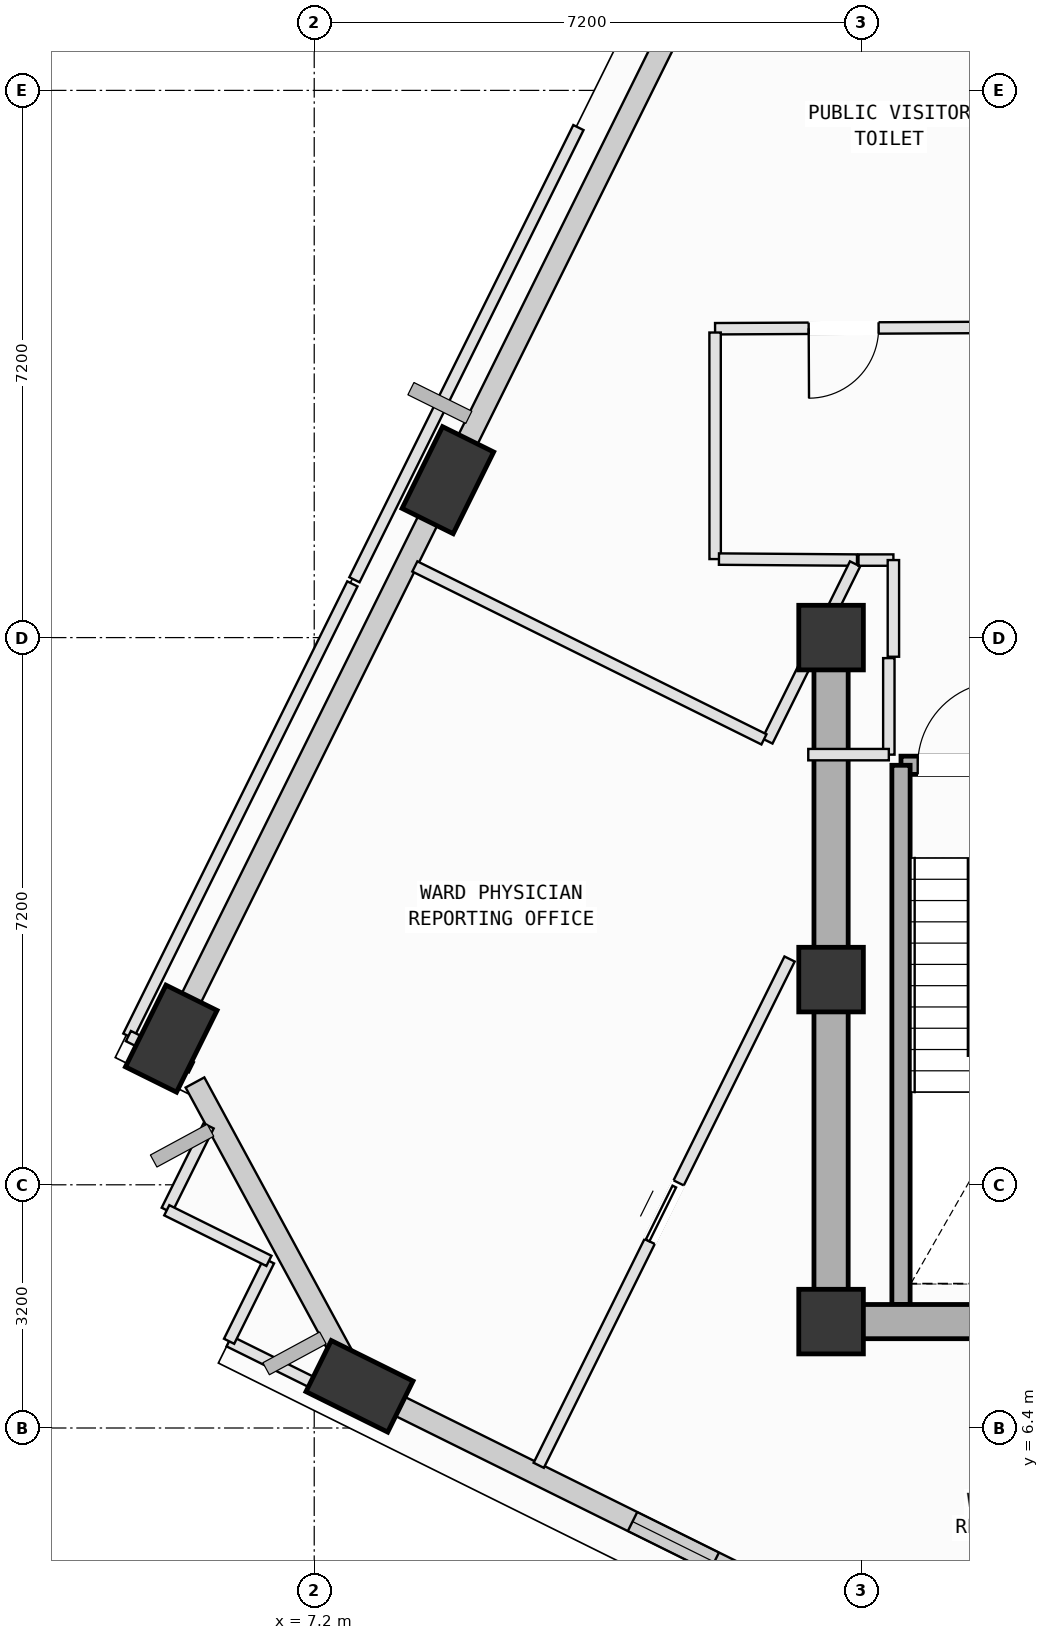
"""IFC4 building model, lengths in metres.
Left out: names, types, materials, properties, quantities, classifications, styles, units other than length and angle.
Written with IfcOpenShell. Run it as: python <this file> out.ifc"""

import sys

from ifc_helpers import new_model, si_unit, direction, frame, frame_2d, origin, origin_2d, place, context, subcontext, project, spatial, rectangle, extrude, element, fill, save


model = new_model("IFC4")
c1 = context("Model", 3, precision=1e-05, world=origin(), true_north=direction((0.0, 1.0)))
c2 = subcontext(c1, "Body", "Model", "MODEL_VIEW")
j1 = project(units=[si_unit("LENGTHUNIT", "METRE"), si_unit("PLANEANGLEUNIT", "RADIAN")], contexts=[c1])
p1 = place(None, origin())
s1 = spatial("IfcSite", under=j1, at=p1, CompositionType="ELEMENT")
p2 = place(p1, origin())
s2 = spatial("IfcBuilding", under=s1, at=p2, CompositionType="ELEMENT")
p3 = place(p2, frame((0.0, 0.0, 296.6)))
s3 = spatial("IfcBuildingStorey", under=s2, at=p3, CompositionType="ELEMENT", Elevation=296.6)
for number, where, z_axis, x_axis in (
    (1, (14.0, 7.8, 0.0), (0.0, 0.0, 1.0), (1.0, 0.0, 0.0)),
    (2, (14.0, 12.3, 0.0), (0.0, 0.0, 1.0), (1.0, 0.0, 0.0)),
    (3, (14.0, 16.8, 0.0), (0.0, 0.0, 1.0), (1.0, 0.0, 0.0)),
):
    element("IfcColumn", number, at=place(p3, frame(where, z_axis=z_axis, x_axis=x_axis)), inside=s3, PredefinedType="COLUMN", context=c2, shape_type="SweptSolid", body=[
        extrude(rectangle(XDim=0.85, YDim=0.85, at=origin_2d()), origin(), (0.0, 0.0, 1.0), 4.0),
    ])
p4 = place(p3, frame((8.958, 18.871, 0.002), z_axis=(0.025274890119, -0.101342588264, 0.994530471998), x_axis=(0.215002324818, 0.972118317881, 0.093594745379)))
e4 = element("IfcColumn", 4, at=p4, inside=s3, PredefinedType="COLUMN", context=c2, shape_type="SweptSolid", body=[
    extrude(rectangle(XDim=1.2, YDim=0.75, at=origin_2d()), origin(), (0.0, 0.0, 1.0), 4.018),
])
p5 = place(p3, frame((5.319, 11.523, 0.002), z_axis=(0.055495895792, -0.115838594711, 0.991716504615), x_axis=(0.016329389577, 0.993219639366, 0.115100386683)))
e5 = element("IfcColumn", 5, at=p5, inside=s3, PredefinedType="COLUMN", context=c2, shape_type="SweptSolid", body=[
    extrude(rectangle(XDim=1.2, YDim=0.75, at=origin_2d()), origin(), (0.0, 0.0, 1.0), 4.03),
])
p6 = place(p3, frame((7.796, 6.948, 0.002), z_axis=(0.074271893377, -0.105470935048, 0.991644879841), x_axis=(-0.986085355278, -0.156068608099, 0.057256105985)))
e6 = element("IfcColumn", 6, at=p6, inside=s3, PredefinedType="COLUMN", context=c2, shape_type="SweptSolid", body=[
    extrude(rectangle(XDim=1.2, YDim=0.75, at=origin_2d()), origin(), (0.0, 0.0, 1.0), 4.03),
])
p7 = place(p3, frame((9.053, 19.062, 0.0), z_axis=(0.0, 0.0, 1.0), x_axis=(0.443860814278, 0.896095741285, 0.0)))
e7 = element("IfcWall", 7, at=p7, inside=s3, PredefinedType="SOLIDWALL", context=c2, shape_type="SweptSolid", body=[
    extrude(rectangle(XDim=7.434, YDim=0.28, at=frame_2d((3.717, 0.0))), origin(), (0.0, 0.0, 1.0), 3.265),
])
p8 = place(p3, frame((5.399, 11.686, 0.0), z_axis=(0.0, 0.0, 1.0), x_axis=(0.443844166841, 0.896103987025, 0.0)))
e8 = element("IfcWall", 8, at=p8, inside=s3, PredefinedType="SOLIDWALL", context=c2, shape_type="SweptSolid", body=[
    extrude(rectangle(XDim=7.485, YDim=0.28, at=frame_2d((3.742, 0.0))), origin(), (0.0, 0.0, 1.0), 3.265),
])
p9 = place(p3, frame((7.73, 7.07, 0.0), z_axis=(0.0, 0.0, 1.0), x_axis=(-0.476110062992, 0.879385699177, 0.0)))
e9 = element("IfcWall", 9, at=p9, inside=s3, PredefinedType="SOLIDWALL", context=c2, shape_type="SweptSolid", body=[
    extrude(rectangle(XDim=4.408, YDim=0.28, at=frame_2d((2.204, 0.0))), origin(), (0.0, 0.0, 1.0), 3.265),
])
p10 = place(p3, frame((13.563, 4.092, 0.0), z_axis=(0.0, 0.0, 1.0), x_axis=(-0.896112517924, 0.443826942873, 0.0)))
e10 = element("IfcWall", 10, at=p10, inside=s3, PredefinedType="SOLIDWALL", context=c2, shape_type="SweptSolid", body=[
    extrude(rectangle(XDim=5.83, YDim=0.28, at=frame_2d((2.915, 0.0))), origin(), (0.0, 0.0, 1.0), 3.265),
])
p11 = place(p10, frame((1.228, 0.0, 0.75)))
e11 = element("IfcOpeningElement", 11, at=p11, cuts=e10, PredefinedType="OPENING", context=c2, shape_type="SweptSolid", body=[
    extrude(rectangle(XDim=1.2, YDim=1.75, at=frame_2d((0.6, 0.875))), frame((0.0, 0.15, 0.0), z_axis=(0.0, -1.0, 0.0), x_axis=(1.0, 0.0, 0.0)), (0.0, 0.0, 1.0), 0.3),
])
p12 = place(p3, frame((14.92, 15.12, 0.0), z_axis=(0.0, 0.0, 1.0), x_axis=(1.0, 0.0, 0.0)))
e12 = element("IfcWall", 12, at=p12, inside=s3, PredefinedType="SOLIDWALL", context=c2, shape_type="SweptSolid", body=[
    extrude(rectangle(XDim=3.46, YDim=0.24, at=frame_2d((1.73, 0.0))), origin(), (0.0, 0.0, 1.0), 3.78),
])
p13 = place(p12, frame((0.22, 0.0, 0.0)))
e13 = element("IfcOpeningElement", 13, at=p13, cuts=e12, PredefinedType="OPENING", context=c2, shape_type="SweptSolid", body=[
    extrude(rectangle(XDim=1.1, YDim=2.15, at=frame_2d((0.55, 1.075))), frame((0.0, 0.13, 0.0), z_axis=(0.0, -1.0, 0.0), x_axis=(1.0, 0.0, 0.0)), (0.0, 0.0, 1.0), 0.26),
])
p14 = place(p3, frame((14.92, 8.025, 0.0), z_axis=(0.0, 0.0, 1.0), x_axis=(0.0, 1.0, 0.0)))
e14 = element("IfcWall", 14, at=p14, inside=s3, PredefinedType="SOLIDWALL", context=c2, shape_type="SweptSolid", body=[
    extrude(rectangle(XDim=7.095, YDim=0.24, at=frame_2d((3.548, 0.0))), origin(), (0.0, 0.0, 1.0), 3.78),
])
p15 = place(p3, frame((14.0, 7.8, 0.0), z_axis=(0.0, 0.0, 1.0), x_axis=(1.0, 0.0, 0.0)))
e15 = element("IfcWall", 15, at=p15, inside=s3, PredefinedType="SHEAR", context=c2, shape_type="SweptSolid", body=[
    extrude(rectangle(XDim=10.8, YDim=0.45, at=frame_2d((5.4, 0.0))), origin(), (0.0, 0.0, 1.0), 3.78),
])
p16 = place(p3, frame((14.0, 16.8, 0.0), z_axis=(0.0, 0.0, 1.0), x_axis=(0.0, -1.0, 0.0)))
e16 = element("IfcWall", 16, at=p16, inside=s3, PredefinedType="SHEAR", context=c2, shape_type="SweptSolid", body=[
    extrude(rectangle(XDim=9.0, YDim=0.45, at=frame_2d((4.5, 0.0))), origin(), (0.0, 0.0, 1.0), 3.78),
])
p17 = place(p3, frame((10.154, 5.909, 0.0), z_axis=(0.0, 0.0, 1.0), x_axis=(0.443874121777, 0.896089149592, 0.0)))
e17 = element("IfcWall", 17, at=p17, inside=s3, PredefinedType="PARTITIONING", context=c2, shape_type="SweptSolid", body=[
    extrude(rectangle(XDim=7.435, YDim=0.15, at=frame_2d((3.717, 0.0))), origin(), (0.0, 0.0, 1.0), 3.78),
])
p18 = place(p17, frame((3.287, 0.0, 0.0)))
e18 = element("IfcOpeningElement", 18, at=p18, cuts=e17, PredefinedType="OPENING", context=c2, shape_type="SweptSolid", body=[
    extrude(rectangle(XDim=0.86, YDim=2.06, at=frame_2d((0.43, 1.03))), frame((0.0, 0.085, 0.0), z_axis=(0.0, -1.0, 0.0), x_axis=(1.0, 0.0, 0.0)), (0.0, 0.0, 1.0), 0.17),
])
p19 = place(p3, frame((5.26, 9.265, 0.0), z_axis=(0.0, 0.0, 1.0), x_axis=(0.443978872549, 0.896037254097, 0.0)))
e19 = element("IfcWall", 19, at=p19, inside=s3, PredefinedType="PARTITIONING", context=c2, shape_type="SweptSolid", body=[
    extrude(rectangle(XDim=1.239, YDim=0.15, at=frame_2d((0.62, 0.0))), origin(), (0.0, 0.0, 1.0), 3.78),
])
p20 = place(p3, frame((8.237, 6.473, 0.0), z_axis=(0.0, 0.0, 1.0), x_axis=(-0.896144873262, 0.443761609567, 0.0)))
e20 = element("IfcWall", 20, at=p20, inside=s3, PredefinedType="PARTITIONING", context=c2, shape_type="SweptSolid", body=[
    extrude(rectangle(XDim=2.407, YDim=0.15, at=frame_2d((1.204, 0.0))), origin(), (0.0, 0.0, 1.0), 3.265),
])
p21 = place(p3, frame((6.08, 7.541, 0.0), z_axis=(0.0, 0.0, 1.0), x_axis=(0.443736423922, 0.896157344491, 0.0)))
e21 = element("IfcWall", 21, at=p21, inside=s3, PredefinedType="PARTITIONING", context=c2, shape_type="SweptSolid", body=[
    extrude(rectangle(XDim=1.181, YDim=0.15, at=frame_2d((0.59, 0.0))), origin(), (0.0, 0.0, 1.0), 3.78),
])
p22 = place(p3, frame((6.604, 8.599, 0.0), z_axis=(0.0, 0.0, 1.0), x_axis=(-0.896081341139, 0.443889885065, 0.0)))
e22 = element("IfcWall", 22, at=p22, inside=s3, PredefinedType="PARTITIONING", context=c2, shape_type="SweptSolid", body=[
    extrude(rectangle(XDim=1.5, YDim=0.15, at=frame_2d((0.75, 0.0))), origin(), (0.0, 0.0, 1.0), 3.78),
])
p23 = place(p3, frame((15.857, 20.88, 0.0), z_axis=(0.0, 0.0, 1.0), x_axis=(-0.999988996932, -0.004691056928, 0.0)))
e23 = element("IfcWall", 23, at=p23, inside=s3, PredefinedType="PARTITIONING", context=c2, shape_type="SweptSolid", body=[
    extrude(rectangle(XDim=3.383, YDim=0.15, at=frame_2d((1.691, 0.0))), origin(), (0.0, 0.0, 1.0), 3.415),
])
p24 = place(p23, frame((1.231, 0.0, 0.0)))
e24 = element("IfcOpeningElement", 24, at=p24, cuts=e23, PredefinedType="OPENING", context=c2, shape_type="SweptSolid", body=[
    extrude(rectangle(XDim=0.92, YDim=2.1, at=frame_2d((0.46, 1.05))), frame((0.0, 0.085, 0.0), z_axis=(0.0, -1.0, 0.0), x_axis=(1.0, 0.0, 0.0)), (0.0, 0.0, 1.0), 0.17),
])
p25 = place(p3, frame((12.474, 20.814, 0.0), z_axis=(0.0, 0.0, 1.0), x_axis=(0.00032760031, -0.999999946339, 0.0)))
e25 = element("IfcWall", 25, at=p25, inside=s3, PredefinedType="PARTITIONING", context=c2, shape_type="SweptSolid", body=[
    extrude(rectangle(XDim=2.981, YDim=0.15, at=frame_2d((1.49, 0.0))), origin(), (0.0, 0.0, 1.0), 3.415),
])
p26 = place(p3, frame((12.525, 17.833, 0.0), z_axis=(0.0, 0.0, 1.0), x_axis=(0.999974620907, -0.007124432707, 0.0)))
e26 = element("IfcWall", 26, at=p26, inside=s3, PredefinedType="PARTITIONING", context=c2, shape_type="SweptSolid", body=[
    extrude(rectangle(XDim=1.816, YDim=0.15, at=frame_2d((0.908, 0.0))), origin(), (0.0, 0.0, 1.0), 3.78),
])
p27 = place(p3, frame((14.316, 17.77, 0.0), z_axis=(0.0, 0.0, 1.0), x_axis=(-0.443525386391, -0.896261809756, 0.0)))
e27 = element("IfcWall", 27, at=p27, inside=s3, PredefinedType="PARTITIONING", context=c2, shape_type="SweptSolid", body=[
    extrude(rectangle(XDim=0.875, YDim=0.15, at=frame_2d((0.438, 0.0))), origin(), (0.0, 0.0, 1.0), 3.78),
])
p28 = place(p3, frame((13.8, 16.727, 0.0), z_axis=(0.0, 0.0, 1.0), x_axis=(-0.443813405685, -0.8961192225, 0.0)))
e28 = element("IfcWall", 28, at=p28, inside=s3, PredefinedType="PARTITIONING", context=c2, shape_type="SweptSolid", body=[
    extrude(rectangle(XDim=1.438, YDim=0.15, at=frame_2d((0.719, 0.0))), origin(), (0.0, 0.0, 1.0), 3.78),
])
p29 = place(p3, frame((13.117, 15.461, 0.0), z_axis=(0.0, 0.0, 1.0), x_axis=(-0.896088072768, 0.443876295653, 0.0)))
e29 = element("IfcWall", 29, at=p29, inside=s3, PredefinedType="PARTITIONING", context=c2, shape_type="SweptSolid", body=[
    extrude(rectangle(XDim=5.126, YDim=0.15, at=frame_2d((2.563, 0.0))), origin(), (0.0, 0.0, 1.0), 3.78),
])
p30 = place(p3, frame((8.551, 18.477, 0.0), z_axis=(0.0, 0.0, 1.0), x_axis=(0.444076193539, 0.895989025788, 0.0)))
e30 = element("IfcWall", 30, at=p30, inside=s3, PredefinedType="PARTITIONING", context=c2, shape_type="SweptSolid", body=[
    extrude(rectangle(XDim=0.748, YDim=0.15, at=frame_2d((0.374, 0.0))), origin(), (0.0, 0.0, 1.0), 3.78),
])
p31 = place(p3, frame((4.755, 11.557, 0.0), z_axis=(0.0, 0.0, 1.0), x_axis=(0.443827732057, 0.896112127056, 0.0)))
e31 = element("IfcWall", 31, at=p31, inside=s3, PredefinedType="PARTITIONING", context=c2, shape_type="SweptSolid", body=[
    extrude(rectangle(XDim=6.64, YDim=0.15, at=frame_2d((3.32, 0.0))), origin(), (0.0, 0.0, 1.0), 3.78),
])
p32 = place(p3, frame((5.584, 11.146, 0.0), z_axis=(0.0, 0.0, 1.0), x_axis=(-0.896004634368, 0.444044699541, 0.0)))
e32 = element("IfcWall", 32, at=p32, inside=s3, PredefinedType="PARTITIONING", context=c2, shape_type="SweptSolid", body=[
    extrude(rectangle(XDim=0.925, YDim=0.15, at=frame_2d((0.463, 0.0))), origin(), (0.0, 0.0, 1.0), 3.78),
])
p33 = place(p3, frame((14.76, 16.53, 0.0), z_axis=(0.0, 0.0, 1.0), x_axis=(0.0, -1.0, 0.0)))
e33 = element("IfcWall", 33, at=p33, inside=s3, PredefinedType="PARTITIONING", context=c2, shape_type="SweptSolid", body=[
    extrude(rectangle(XDim=1.27, YDim=0.15, at=frame_2d((0.635, 0.0))), origin(), (0.0, 0.0, 1.0), 3.78),
])
p34 = place(p3, frame((14.76, 15.26, 0.0), z_axis=(0.0, 0.0, 1.0), x_axis=(-1.0, 0.0, 0.0)))
e34 = element("IfcWall", 34, at=p34, inside=s3, PredefinedType="PARTITIONING", context=c2, shape_type="SweptSolid", body=[
    extrude(rectangle(XDim=1.06, YDim=0.15, at=frame_2d((0.53, 0.0))), origin(), (0.0, 0.0, 1.0), 3.78),
])
p35 = place(p3, frame((7.729, 17.561, 0.0), z_axis=(0.0, 0.0, 1.0), x_axis=(0.443842355867, 0.896104884006, 0.0)))
e35 = element("IfcWall", 35, at=p35, inside=s3, PredefinedType="PARTITIONING", context=c2, shape_type="SweptSolid", body=[
    extrude(rectangle(XDim=6.64, YDim=0.15, at=frame_2d((3.32, 0.0))), origin(), (0.0, 0.0, 1.0), 3.78),
])
p36 = place(p3, frame((14.361, 17.82, 0.0), z_axis=(0.0, 0.0, 1.0), x_axis=(1.0, 0.0, 0.0)))
e36 = element("IfcWall", 36, at=p36, inside=s3, PredefinedType="PARTITIONING", context=c2, shape_type="SweptSolid", body=[
    extrude(rectangle(XDim=0.459, YDim=0.15, at=frame_2d((0.229, 0.0))), origin(), (0.0, 0.0, 1.0), 3.78),
])
p37 = place(p3, frame((14.82, 17.82, 0.0), z_axis=(0.0, 0.0, 1.0), x_axis=(0.0, -1.0, 0.0)))
e37 = element("IfcWall", 37, at=p37, inside=s3, PredefinedType="PARTITIONING", context=c2, shape_type="SweptSolid", body=[
    extrude(rectangle(XDim=1.272, YDim=0.15, at=frame_2d((0.636, 0.0))), origin(), (0.0, 0.0, 1.0), 3.78),
])
p38 = place(p11, origin())
e38 = element("IfcWindow", 38, at=p38, inside=s3, PartitioningType="SINGLE_PANEL", PredefinedType="WINDOW", context=c2, shape_type="SweptSolid", body=[
    extrude(rectangle(XDim=1.2, YDim=1.75, at=frame_2d((0.6, 0.875))), frame((0.0, 0.03, 0.0), z_axis=(0.0, -1.0, 0.0), x_axis=(1.0, 0.0, 0.0)), (0.0, 0.0, 1.0), 0.06),
])
fill(e11, e38)
p39 = place(p13, origin())
e39 = element("IfcDoor", 39, at=p39, inside=s3, OperationType="SINGLE_SWING_RIGHT", PredefinedType="DOOR", context=c2, shape_type="SweptSolid", body=[
    extrude(rectangle(XDim=1.1, YDim=2.15, at=frame_2d((0.55, 1.075))), frame((0.0, 0.025, 0.0), z_axis=(0.0, -1.0, 0.0), x_axis=(1.0, 0.0, 0.0)), (0.0, 0.0, 1.0), 0.05),
])
fill(e13, e39)
p40 = place(p24, origin())
e40 = element("IfcDoor", 40, at=p40, inside=s3, OperationType="SINGLE_SWING_RIGHT", PredefinedType="DOOR", context=c2, shape_type="SweptSolid", body=[
    extrude(rectangle(XDim=0.92, YDim=2.1, at=frame_2d((0.46, 1.05))), frame((0.0, 0.025, 0.0), z_axis=(0.0, -1.0, 0.0), x_axis=(1.0, 0.0, 0.0)), (0.0, 0.0, 1.0), 0.05),
])
fill(e24, e40)
p41 = place(p18, origin())
e41 = element("IfcDoor", 41, at=p41, inside=s3, OperationType="SLIDING_TO_LEFT", PredefinedType="DOOR", context=c2, shape_type="SweptSolid", body=[
    extrude(rectangle(XDim=0.86, YDim=2.06, at=frame_2d((0.43, 1.03))), frame((0.0, 0.025, 0.0), z_axis=(0.0, -1.0, 0.0), x_axis=(1.0, 0.0, 0.0)), (0.0, 0.0, 1.0), 0.05),
])
fill(e18, e41)
save(model, sys.argv[1])
